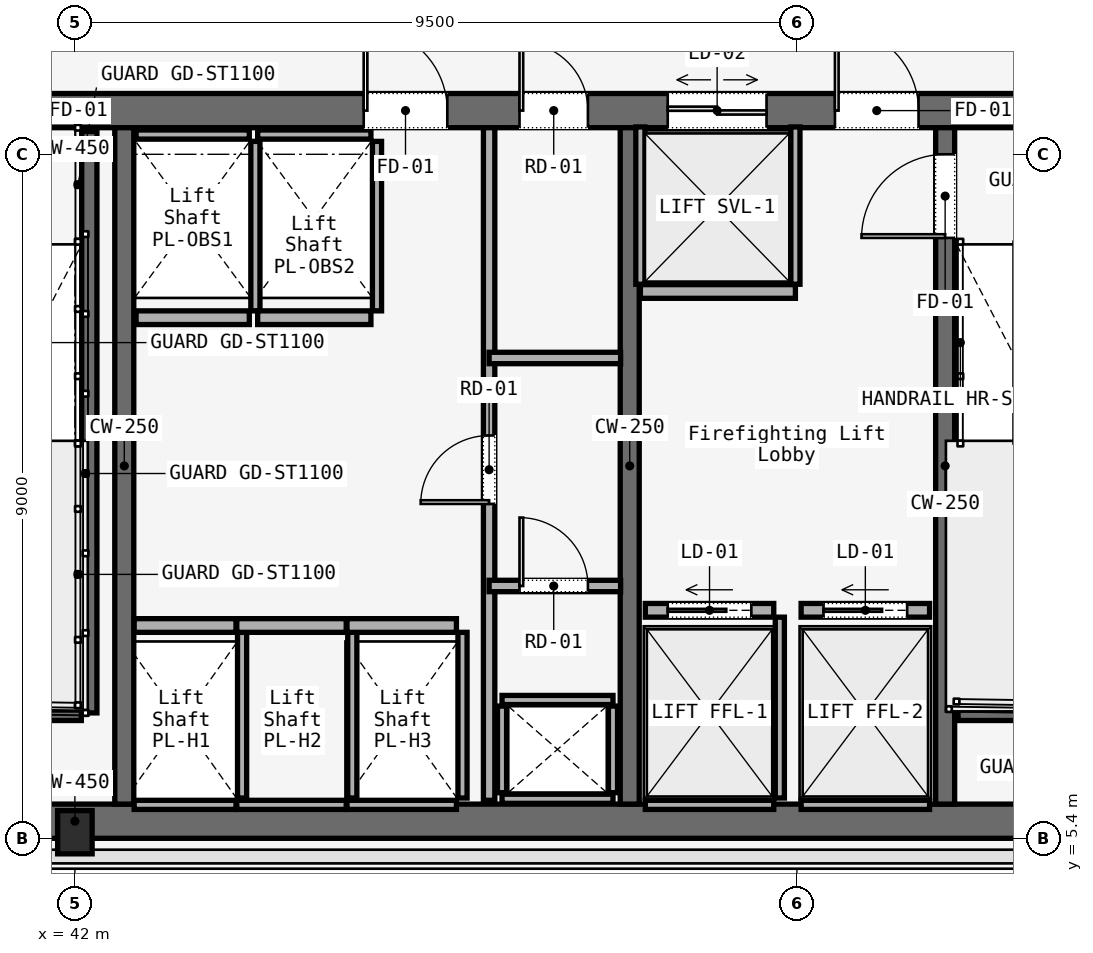
"""IFC4 building model, lengths in metres.
Left out: names, types, materials, properties, quantities, classifications, styles, units other than length and angle.
Written with IfcOpenShell. Run it as: python <this file> out.ifc"""

import sys

from ifc_helpers import new_model, si_unit, direction, frame, frame_2d, origin, origin_2d, place, context, subcontext, project, spatial, rectangle, i_section, extrude, element, fill, save


model = new_model("IFC4")
c1 = context("Model", 3, precision=1e-05, world=origin(), true_north=direction((0.0, 1.0)))
c2 = subcontext(c1, "Body", "Model", "MODEL_VIEW")
j1 = project(units=[si_unit("LENGTHUNIT", "METRE"), si_unit("PLANEANGLEUNIT", "RADIAN")], contexts=[c1])
p1 = place(None, origin())
s1 = spatial("IfcSite", under=j1, at=p1, CompositionType="ELEMENT")
p2 = place(p1, origin())
s2 = spatial("IfcBuilding", under=s1, at=p2, CompositionType="ELEMENT")
p3 = place(p2, frame((0.0, 0.0, 55.0)))
s3 = spatial("IfcBuildingStorey", under=s2, at=p3, CompositionType="ELEMENT", Elevation=55.0)
p4 = place(p3, frame((26.45, 14.975, 0.0), z_axis=(0.0, 0.0, 1.0), x_axis=(1.0, 0.0, 0.0)))
e1 = element("IfcWall", 1, at=p4, inside=s3, PredefinedType="SOLIDWALL", context=c2, shape_type="SweptSolid", body=[
    extrude(rectangle(XDim=31.1, YDim=0.45, at=frame_2d((15.55, 0.0))), origin(), (0.0, 0.0, 1.0), 3.58),
])
p5 = place(p4, frame((1.65, 0.0, 0.0)))
e2 = element("IfcOpeningElement", 2, at=p5, cuts=e1, PredefinedType="OPENING", context=c2, shape_type="SweptSolid", body=[
    extrude(rectangle(XDim=1.1, YDim=2.2, at=frame_2d((0.55, 1.1))), frame((0.0, 0.225, 0.0), z_axis=(0.0, -1.0, 0.0), x_axis=(1.0, 0.0, 0.0)), (0.0, 0.0, 1.0), 0.45),
])
p6 = place(p4, frame((13.65, 0.0, 0.0)))
e3 = element("IfcOpeningElement", 3, at=p6, cuts=e1, PredefinedType="OPENING", context=c2, shape_type="SweptSolid", body=[
    extrude(rectangle(XDim=1.1, YDim=2.2, at=frame_2d((0.55, 1.1))), frame((0.0, 0.225, 0.0), z_axis=(0.0, -1.0, 0.0), x_axis=(1.0, 0.0, 0.0)), (0.0, 0.0, 1.0), 0.45),
])
p7 = place(p4, frame((25.55, 0.0, 0.0)))
e4 = element("IfcOpeningElement", 4, at=p7, cuts=e1, PredefinedType="OPENING", context=c2, shape_type="SweptSolid", body=[
    extrude(rectangle(XDim=1.1, YDim=2.2, at=frame_2d((0.55, 1.1))), frame((0.0, 0.225, 0.0), z_axis=(0.0, -1.0, 0.0), x_axis=(1.0, 0.0, 0.0)), (0.0, 0.0, 1.0), 0.45),
])
p8 = place(p4, frame((10.7, 0.0, 0.0)))
e5 = element("IfcOpeningElement", 5, at=p8, cuts=e1, PredefinedType="OPENING", context=c2, shape_type="SweptSolid", body=[
    extrude(rectangle(XDim=1.4, YDim=2.2, at=frame_2d((0.7, 1.1))), frame((0.0, 0.225, 0.0), z_axis=(0.0, -1.0, 0.0), x_axis=(1.0, 0.0, 0.0)), (0.0, 0.0, 1.0), 0.45),
])
p9 = place(p4, frame((19.35, 0.0, 0.0)))
e6 = element("IfcOpeningElement", 6, at=p9, cuts=e1, PredefinedType="OPENING", context=c2, shape_type="SweptSolid", body=[
    extrude(rectangle(XDim=1.1, YDim=2.2, at=frame_2d((0.55, 1.1))), frame((0.0, 0.225, 0.0), z_axis=(0.0, -1.0, 0.0), x_axis=(1.0, 0.0, 0.0)), (0.0, 0.0, 1.0), 0.45),
])
p10 = place(p4, frame((21.4, 0.0, 0.0)))
e7 = element("IfcOpeningElement", 7, at=p10, cuts=e1, PredefinedType="OPENING", context=c2, shape_type="SweptSolid", body=[
    extrude(rectangle(XDim=0.9, YDim=2.1, at=frame_2d((0.45, 1.05))), frame((0.0, 0.225, 0.0), z_axis=(0.0, -1.0, 0.0), x_axis=(1.0, 0.0, 0.0)), (0.0, 0.0, 1.0), 0.45),
])
p11 = place(p4, frame((23.35, 0.0, 0.0)))
e8 = element("IfcOpeningElement", 8, at=p11, cuts=e1, PredefinedType="OPENING", context=c2, shape_type="SweptSolid", body=[
    extrude(rectangle(XDim=1.3, YDim=2.3, at=frame_2d((0.65, 1.15))), frame((0.0, 0.225, 0.0), z_axis=(0.0, -1.0, 0.0), x_axis=(1.0, 0.0, 0.0)), (0.0, 0.0, 1.0), 0.45),
])
p12 = place(p3, frame((26.45, 5.625, 0.0), z_axis=(0.0, 0.0, 1.0), x_axis=(1.0, 0.0, 0.0)))
e9 = element("IfcWall", 9, at=p12, inside=s3, PredefinedType="SOLIDWALL", context=c2, shape_type="SweptSolid", body=[
    extrude(rectangle(XDim=31.1, YDim=0.45, at=frame_2d((15.55, 0.0))), origin(), (0.0, 0.0, 1.0), 3.58),
])
for number, where, z_axis, x_axis in (
    (10, (42.65, 5.85, 0.0), (0.0, 0.0, 1.0), (0.0, 1.0, 0.0)),
    (11, (49.3, 5.85, 0.0), (0.0, 0.0, 1.0), (0.0, 1.0, 0.0)),
):
    element("IfcWall", number, at=place(p3, frame(where, z_axis=z_axis, x_axis=x_axis)), inside=s3, PredefinedType="SOLIDWALL", context=c2, shape_type="SweptSolid", body=[
        extrude(rectangle(XDim=8.9, YDim=0.25, at=frame_2d((4.45, 0.0))), origin(), (0.0, 0.0, 1.0), 3.58),
    ])
p13 = place(p3, frame((53.45, 5.85, 0.0), z_axis=(0.0, 0.0, 1.0), x_axis=(0.0, 1.0, 0.0)))
e12 = element("IfcWall", 12, at=p13, inside=s3, PredefinedType="SOLIDWALL", context=c2, shape_type="SweptSolid", body=[
    extrude(rectangle(XDim=8.9, YDim=0.25, at=frame_2d((4.45, 0.0))), origin(), (0.0, 0.0, 1.0), 3.58),
])
p14 = place(p13, frame((7.45, 0.0, 0.0)))
e13 = element("IfcOpeningElement", 13, at=p14, cuts=e12, PredefinedType="OPENING", context=c2, shape_type="SweptSolid", body=[
    extrude(rectangle(XDim=1.1, YDim=2.2, at=frame_2d((0.55, 1.1))), frame((0.0, 0.125, 0.0), z_axis=(0.0, -1.0, 0.0), x_axis=(1.0, 0.0, 0.0)), (0.0, 0.0, 1.0), 0.25),
])
p15 = place(p3, frame((42.0, 5.48, 0.0), z_axis=(0.0, 0.0, 1.0), x_axis=(1.0, 0.0, 0.0)))
e14 = element("IfcColumn", 14, at=p15, inside=s3, PredefinedType="COLUMN", context=c2, shape_type="SweptSolid", body=[
    extrude(i_section(OverallWidth=0.454, OverallDepth=0.569, WebThickness=0.078, FlangeThickness=0.08, FilletRadius=0.015, at=origin_2d()), origin(), (0.0, 0.0, 1.0), 3.58),
])
p16 = place(p3, frame((42.19, 14.7, 0.0), z_axis=(0.0, 0.0, 1.0), x_axis=(0.0, -1.0, 0.0)))
e15 = element("IfcWall", 15, at=p16, inside=s3, PredefinedType="SOLIDWALL", context=c2, shape_type="SweptSolid", body=[
    extrude(rectangle(XDim=7.65, YDim=0.2, at=frame_2d((3.825, 0.0))), origin(), (0.0, 0.0, 1.0), 3.8),
])
for number, where, z_axis, x_axis in (
    (16, (38.97, 7.05, 0.0), (0.0, 0.0, 1.0), (1.0, 0.0, 0.0)),
    (17, (53.62, 7.05, 0.0), (0.0, 0.0, 1.0), (1.0, 0.0, 0.0)),
):
    element("IfcWall", number, at=place(p3, frame(where, z_axis=z_axis, x_axis=x_axis)), inside=s3, PredefinedType="SOLIDWALL", context=c2, shape_type="SweptSolid", body=[
        extrude(rectangle(XDim=3.115, YDim=0.2, at=frame_2d((1.558, 0.0))), origin(), (0.0, 0.0, 1.0), 3.8),
    ])
for number, where, z_axis, x_axis in (
    (18, (47.62, 5.92, 0.0), (0.0, 0.0, 1.0), (1.0, 0.0, 0.0)),
    (19, (47.62, 7.22, 0.0), (0.0, 0.0, 1.0), (1.0, 0.0, 0.0)),
):
    element("IfcWall", number, at=place(p3, frame(where, z_axis=z_axis, x_axis=x_axis)), inside=s3, PredefinedType="SOLIDWALL", context=c2, shape_type="SweptSolid", body=[
        extrude(rectangle(XDim=1.46, YDim=0.12, at=frame_2d((0.73, 0.0))), origin(), (0.0, 0.0, 1.0), 2.933),
    ])
for number, where, z_axis, x_axis in (
    (20, (47.62, 6.0, 0.0), (0.0, 0.0, 1.0), (0.0, 1.0, 0.0)),
    (21, (49.08, 6.0, 0.0), (0.0, 0.0, 1.0), (0.0, 1.0, 0.0)),
):
    element("IfcWall", number, at=place(p3, frame(where, z_axis=z_axis, x_axis=x_axis)), inside=s3, PredefinedType="SOLIDWALL", context=c2, shape_type="SweptSolid", body=[
        extrude(rectangle(XDim=1.14, YDim=0.12, at=frame_2d((0.57, 0.0))), origin(), (0.0, 0.0, 1.0), 2.933),
    ])
p17 = place(p3, frame((47.45, 5.9, 0.0), z_axis=(0.0, 0.0, 1.0), x_axis=(0.0, 1.0, 0.0)))
e22 = element("IfcWall", 22, at=p17, inside=s3, PredefinedType="PARTITIONING", context=c2, shape_type="SweptSolid", body=[
    extrude(rectangle(XDim=8.85, YDim=0.15, at=frame_2d((4.425, 0.0))), origin(), (0.0, 0.0, 1.0), 2.933),
])
p18 = place(p17, frame((3.9, 0.0, 0.0)))
e23 = element("IfcOpeningElement", 23, at=p18, cuts=e22, PredefinedType="OPENING", context=c2, shape_type="SweptSolid", body=[
    extrude(rectangle(XDim=0.9, YDim=2.1, at=frame_2d((0.45, 1.05))), frame((0.0, 0.075, 0.0), z_axis=(0.0, -1.0, 0.0), x_axis=(1.0, 0.0, 0.0)), (0.0, 0.0, 1.0), 0.15),
])
p19 = place(p3, frame((47.45, 8.72, 0.0), z_axis=(0.0, 0.0, 1.0), x_axis=(1.0, 0.0, 0.0)))
e24 = element("IfcWall", 24, at=p19, inside=s3, PredefinedType="PARTITIONING", context=c2, shape_type="SweptSolid", body=[
    extrude(rectangle(XDim=1.73, YDim=0.15, at=frame_2d((0.865, 0.0))), origin(), (0.0, 0.0, 1.0), 2.933),
])
p20 = place(p19, frame((0.4, 0.0, 0.0)))
e25 = element("IfcOpeningElement", 25, at=p20, cuts=e24, PredefinedType="OPENING", context=c2, shape_type="SweptSolid", body=[
    extrude(rectangle(XDim=0.9, YDim=2.1, at=frame_2d((0.45, 1.05))), frame((0.0, 0.075, 0.0), z_axis=(0.0, -1.0, 0.0), x_axis=(1.0, 0.0, 0.0)), (0.0, 0.0, 1.0), 0.15),
])
p21 = place(p3, frame((47.45, 11.72, 0.0), z_axis=(0.0, 0.0, 1.0), x_axis=(1.0, 0.0, 0.0)))
e26 = element("IfcWall", 26, at=p21, inside=s3, PredefinedType="PARTITIONING", context=c2, shape_type="SweptSolid", body=[
    extrude(rectangle(XDim=1.73, YDim=0.15, at=frame_2d((0.865, 0.0))), origin(), (0.0, 0.0, 1.0), 2.933),
])
p22 = place(p3, frame((42.78, 8.2, 0.0), z_axis=(0.0, 0.0, 1.0), x_axis=(1.0, 0.0, 0.0)))
e27 = element("IfcWall", 27, at=p22, inside=s3, PredefinedType="SOLIDWALL", context=c2, shape_type="SweptSolid", body=[
    extrude(rectangle(XDim=1.34, YDim=0.18, at=frame_2d((0.67, 0.0))), origin(), (0.0, 0.0, 1.0), 2.933),
])
p23 = place(p3, frame((42.78, 5.84, 0.0), z_axis=(0.0, 0.0, 1.0), x_axis=(1.0, 0.0, 0.0)))
e28 = element("IfcWall", 28, at=p23, inside=s3, PredefinedType="SOLIDWALL", context=c2, shape_type="SweptSolid", body=[
    extrude(rectangle(XDim=1.34, YDim=0.12, at=frame_2d((0.67, 0.0))), origin(), (0.0, 0.0, 1.0), 2.933),
])
p24 = place(p3, frame((44.2, 5.93, 0.0), z_axis=(0.0, 0.0, 1.0), x_axis=(0.0, 1.0, 0.0)))
e29 = element("IfcWall", 29, at=p24, inside=s3, PredefinedType="SOLIDWALL", context=c2, shape_type="SweptSolid", body=[
    extrude(rectangle(XDim=2.18, YDim=0.12, at=frame_2d((1.09, 0.0))), origin(), (0.0, 0.0, 1.0), 2.933),
])
p25 = place(p3, frame((44.13, 8.2, 0.0), z_axis=(0.0, 0.0, 1.0), x_axis=(1.0, 0.0, 0.0)))
e30 = element("IfcWall", 30, at=p25, inside=s3, PredefinedType="SOLIDWALL", context=c2, shape_type="SweptSolid", body=[
    extrude(rectangle(XDim=1.44, YDim=0.18, at=frame_2d((0.72, 0.0))), origin(), (0.0, 0.0, 1.0), 2.933),
])
p26 = place(p3, frame((44.13, 5.84, 0.0), z_axis=(0.0, 0.0, 1.0), x_axis=(1.0, 0.0, 0.0)))
e31 = element("IfcWall", 31, at=p26, inside=s3, PredefinedType="SOLIDWALL", context=c2, shape_type="SweptSolid", body=[
    extrude(rectangle(XDim=1.44, YDim=0.12, at=frame_2d((0.72, 0.0))), origin(), (0.0, 0.0, 1.0), 2.933),
])
p27 = place(p3, frame((45.65, 5.93, 0.0), z_axis=(0.0, 0.0, 1.0), x_axis=(0.0, 1.0, 0.0)))
e32 = element("IfcWall", 32, at=p27, inside=s3, PredefinedType="SOLIDWALL", context=c2, shape_type="SweptSolid", body=[
    extrude(rectangle(XDim=2.18, YDim=0.12, at=frame_2d((1.09, 0.0))), origin(), (0.0, 0.0, 1.0), 2.933),
])
p28 = place(p3, frame((45.58, 8.2, 0.0), z_axis=(0.0, 0.0, 1.0), x_axis=(1.0, 0.0, 0.0)))
e33 = element("IfcWall", 33, at=p28, inside=s3, PredefinedType="SOLIDWALL", context=c2, shape_type="SweptSolid", body=[
    extrude(rectangle(XDim=1.44, YDim=0.18, at=frame_2d((0.72, 0.0))), origin(), (0.0, 0.0, 1.0), 2.933),
])
p29 = place(p3, frame((45.58, 5.84, 0.0), z_axis=(0.0, 0.0, 1.0), x_axis=(1.0, 0.0, 0.0)))
e34 = element("IfcWall", 34, at=p29, inside=s3, PredefinedType="SOLIDWALL", context=c2, shape_type="SweptSolid", body=[
    extrude(rectangle(XDim=1.44, YDim=0.12, at=frame_2d((0.72, 0.0))), origin(), (0.0, 0.0, 1.0), 2.933),
])
p30 = place(p3, frame((47.1, 5.93, 0.0), z_axis=(0.0, 0.0, 1.0), x_axis=(0.0, 1.0, 0.0)))
e35 = element("IfcWall", 35, at=p30, inside=s3, PredefinedType="SOLIDWALL", context=c2, shape_type="SweptSolid", body=[
    extrude(rectangle(XDim=2.18, YDim=0.12, at=frame_2d((1.09, 0.0))), origin(), (0.0, 0.0, 1.0), 2.933),
])
p31 = place(p3, frame((42.805, 12.25, 0.0), z_axis=(0.0, 0.0, 1.0), x_axis=(1.0, 0.0, 0.0)))
e36 = element("IfcWall", 36, at=p31, inside=s3, PredefinedType="SOLIDWALL", context=c2, shape_type="SweptSolid", body=[
    extrude(rectangle(XDim=1.49, YDim=0.18, at=frame_2d((0.745, 0.0))), origin(), (0.0, 0.0, 1.0), 2.933),
])
p32 = place(p3, frame((42.805, 14.66, 0.0), z_axis=(0.0, 0.0, 1.0), x_axis=(1.0, 0.0, 0.0)))
e37 = element("IfcWall", 37, at=p32, inside=s3, PredefinedType="SOLIDWALL", context=c2, shape_type="SweptSolid", body=[
    extrude(rectangle(XDim=1.49, YDim=0.12, at=frame_2d((0.745, 0.0))), origin(), (0.0, 0.0, 1.0), 2.933),
])
p33 = place(p3, frame((44.375, 12.34, 0.0), z_axis=(0.0, 0.0, 1.0), x_axis=(0.0, 1.0, 0.0)))
e38 = element("IfcWall", 38, at=p33, inside=s3, PredefinedType="SOLIDWALL", context=c2, shape_type="SweptSolid", body=[
    extrude(rectangle(XDim=2.23, YDim=0.12, at=frame_2d((1.115, 0.0))), origin(), (0.0, 0.0, 1.0), 2.933),
])
p34 = place(p3, frame((44.405, 12.25, 0.0), z_axis=(0.0, 0.0, 1.0), x_axis=(1.0, 0.0, 0.0)))
e39 = element("IfcWall", 39, at=p34, inside=s3, PredefinedType="SOLIDWALL", context=c2, shape_type="SweptSolid", body=[
    extrude(rectangle(XDim=1.49, YDim=0.18, at=frame_2d((0.745, 0.0))), origin(), (0.0, 0.0, 1.0), 2.933),
])
p35 = place(p3, frame((44.405, 14.66, 0.0), z_axis=(0.0, 0.0, 1.0), x_axis=(1.0, 0.0, 0.0)))
e40 = element("IfcWall", 40, at=p35, inside=s3, PredefinedType="SOLIDWALL", context=c2, shape_type="SweptSolid", body=[
    extrude(rectangle(XDim=1.49, YDim=0.12, at=frame_2d((0.745, 0.0))), origin(), (0.0, 0.0, 1.0), 2.933),
])
p36 = place(p3, frame((45.975, 12.34, 0.0), z_axis=(0.0, 0.0, 1.0), x_axis=(0.0, 1.0, 0.0)))
e41 = element("IfcWall", 41, at=p36, inside=s3, PredefinedType="SOLIDWALL", context=c2, shape_type="SweptSolid", body=[
    extrude(rectangle(XDim=2.23, YDim=0.12, at=frame_2d((1.115, 0.0))), origin(), (0.0, 0.0, 1.0), 2.933),
])
p37 = place(p3, frame((49.505, 8.4, 0.0), z_axis=(0.0, 0.0, 1.0), x_axis=(1.0, 0.0, 0.0)))
e42 = element("IfcWall", 42, at=p37, inside=s3, PredefinedType="SOLIDWALL", context=c2, shape_type="SweptSolid", body=[
    extrude(rectangle(XDim=1.69, YDim=0.18, at=frame_2d((0.845, 0.0))), origin(), (0.0, 0.0, 1.0), 2.933),
])
p38 = place(p37, frame((0.295, 0.0, 0.0)))
e43 = element("IfcOpeningElement", 43, at=p38, cuts=e42, PredefinedType="OPENING", context=c2, shape_type="SweptSolid", body=[
    extrude(rectangle(XDim=1.1, YDim=2.2, at=frame_2d((0.55, 1.1))), frame((0.0, 0.09, 0.0), z_axis=(0.0, -1.0, 0.0), x_axis=(1.0, 0.0, 0.0)), (0.0, 0.0, 1.0), 0.18),
])
p39 = place(p3, frame((49.505, 5.84, 0.0), z_axis=(0.0, 0.0, 1.0), x_axis=(1.0, 0.0, 0.0)))
e44 = element("IfcWall", 44, at=p39, inside=s3, PredefinedType="SOLIDWALL", context=c2, shape_type="SweptSolid", body=[
    extrude(rectangle(XDim=1.69, YDim=0.12, at=frame_2d((0.845, 0.0))), origin(), (0.0, 0.0, 1.0), 2.933),
])
p40 = place(p3, frame((51.275, 5.93, 0.0), z_axis=(0.0, 0.0, 1.0), x_axis=(0.0, 1.0, 0.0)))
e45 = element("IfcWall", 45, at=p40, inside=s3, PredefinedType="SOLIDWALL", context=c2, shape_type="SweptSolid", body=[
    extrude(rectangle(XDim=2.38, YDim=0.12, at=frame_2d((1.19, 0.0))), origin(), (0.0, 0.0, 1.0), 2.933),
])
p41 = place(p3, frame((51.555, 8.4, 0.0), z_axis=(0.0, 0.0, 1.0), x_axis=(1.0, 0.0, 0.0)))
e46 = element("IfcWall", 46, at=p41, inside=s3, PredefinedType="SOLIDWALL", context=c2, shape_type="SweptSolid", body=[
    extrude(rectangle(XDim=1.69, YDim=0.18, at=frame_2d((0.845, 0.0))), origin(), (0.0, 0.0, 1.0), 2.933),
])
p42 = place(p41, frame((0.295, 0.0, 0.0)))
e47 = element("IfcOpeningElement", 47, at=p42, cuts=e46, PredefinedType="OPENING", context=c2, shape_type="SweptSolid", body=[
    extrude(rectangle(XDim=1.1, YDim=2.2, at=frame_2d((0.55, 1.1))), frame((0.0, 0.09, 0.0), z_axis=(0.0, -1.0, 0.0), x_axis=(1.0, 0.0, 0.0)), (0.0, 0.0, 1.0), 0.18),
])
p43 = place(p3, frame((51.555, 5.84, 0.0), z_axis=(0.0, 0.0, 1.0), x_axis=(1.0, 0.0, 0.0)))
e48 = element("IfcWall", 48, at=p43, inside=s3, PredefinedType="SOLIDWALL", context=c2, shape_type="SweptSolid", body=[
    extrude(rectangle(XDim=1.69, YDim=0.12, at=frame_2d((0.845, 0.0))), origin(), (0.0, 0.0, 1.0), 2.933),
])
p44 = place(p3, frame((49.44, 12.595, 0.0), z_axis=(0.0, 0.0, 1.0), x_axis=(1.0, 0.0, 0.0)))
e49 = element("IfcWall", 49, at=p44, inside=s3, PredefinedType="SOLIDWALL", context=c2, shape_type="SweptSolid", body=[
    extrude(rectangle(XDim=2.04, YDim=0.18, at=frame_2d((1.02, 0.0))), origin(), (0.0, 0.0, 1.0), 2.933),
])
for number, where, z_axis, x_axis in (
    (50, (49.44, 12.69, 0.0), (0.0, 0.0, 1.0), (0.0, 1.0, 0.0)),
    (51, (51.48, 12.69, 0.0), (0.0, 0.0, 1.0), (0.0, 1.0, 0.0)),
):
    element("IfcWall", number, at=place(p3, frame(where, z_axis=z_axis, x_axis=x_axis)), inside=s3, PredefinedType="SOLIDWALL", context=c2, shape_type="SweptSolid", body=[
        extrude(rectangle(XDim=2.07, YDim=0.12, at=frame_2d((1.035, 0.0))), origin(), (0.0, 0.0, 1.0), 2.933),
    ])
p45 = place(p7, origin())
e52 = element("IfcDoor", 52, at=p45, inside=s3, OperationType="SINGLE_SWING_RIGHT", PredefinedType="DOOR", context=c2, shape_type="SweptSolid", body=[
    extrude(rectangle(XDim=1.1, YDim=2.2, at=frame_2d((0.55, 1.1))), frame((0.0, 0.025, 0.0), z_axis=(0.0, -1.0, 0.0), x_axis=(1.0, 0.0, 0.0)), (0.0, 0.0, 1.0), 0.05),
])
fill(e4, e52)
p46 = place(p9, origin())
e53 = element("IfcDoor", 53, at=p46, inside=s3, OperationType="SINGLE_SWING_LEFT", PredefinedType="DOOR", context=c2, shape_type="SweptSolid", body=[
    extrude(rectangle(XDim=1.1, YDim=2.2, at=frame_2d((0.55, 1.1))), frame((0.0, 0.025, 0.0), z_axis=(0.0, -1.0, 0.0), x_axis=(1.0, 0.0, 0.0)), (0.0, 0.0, 1.0), 0.05),
])
fill(e6, e53)
p47 = place(p10, origin())
e54 = element("IfcDoor", 54, at=p47, inside=s3, OperationType="SINGLE_SWING_LEFT", PredefinedType="DOOR", context=c2, shape_type="SweptSolid", body=[
    extrude(rectangle(XDim=0.9, YDim=2.1, at=frame_2d((0.45, 1.05))), frame((0.0, 0.025, 0.0), z_axis=(0.0, -1.0, 0.0), x_axis=(1.0, 0.0, 0.0)), (0.0, 0.0, 1.0), 0.05),
])
fill(e7, e54)
p48 = place(p14, origin())
e55 = element("IfcDoor", 55, at=p48, inside=s3, OperationType="SINGLE_SWING_LEFT", PredefinedType="DOOR", context=c2, shape_type="SweptSolid", body=[
    extrude(rectangle(XDim=1.1, YDim=2.2, at=frame_2d((0.55, 1.1))), frame((0.0, 0.025, 0.0), z_axis=(0.0, -1.0, 0.0), x_axis=(1.0, 0.0, 0.0)), (0.0, 0.0, 1.0), 0.05),
])
fill(e13, e55)
p49 = place(p18, origin())
e56 = element("IfcDoor", 56, at=p49, inside=s3, OperationType="SINGLE_SWING_LEFT", PredefinedType="DOOR", context=c2, shape_type="SweptSolid", body=[
    extrude(rectangle(XDim=0.9, YDim=2.1, at=frame_2d((0.45, 1.05))), frame((0.0, 0.025, 0.0), z_axis=(0.0, -1.0, 0.0), x_axis=(1.0, 0.0, 0.0)), (0.0, 0.0, 1.0), 0.05),
])
fill(e23, e56)
p50 = place(p20, origin())
e57 = element("IfcDoor", 57, at=p50, inside=s3, OperationType="SINGLE_SWING_RIGHT", PredefinedType="DOOR", context=c2, shape_type="SweptSolid", body=[
    extrude(rectangle(XDim=0.9, YDim=2.1, at=frame_2d((0.45, 1.05))), frame((0.0, 0.025, 0.0), z_axis=(0.0, -1.0, 0.0), x_axis=(1.0, 0.0, 0.0)), (0.0, 0.0, 1.0), 0.05),
])
fill(e25, e57)
p51 = place(p38, origin())
e58 = element("IfcDoor", 58, at=p51, inside=s3, OperationType="SLIDING_TO_LEFT", PredefinedType="DOOR", context=c2, shape_type="SweptSolid", body=[
    extrude(rectangle(XDim=1.1, YDim=2.2, at=frame_2d((0.55, 1.1))), frame((0.0, 0.025, 0.0), z_axis=(0.0, -1.0, 0.0), x_axis=(1.0, 0.0, 0.0)), (0.0, 0.0, 1.0), 0.05),
])
fill(e43, e58)
p52 = place(p42, origin())
e59 = element("IfcDoor", 59, at=p52, inside=s3, OperationType="SLIDING_TO_LEFT", PredefinedType="DOOR", context=c2, shape_type="SweptSolid", body=[
    extrude(rectangle(XDim=1.1, YDim=2.2, at=frame_2d((0.55, 1.1))), frame((0.0, 0.025, 0.0), z_axis=(0.0, -1.0, 0.0), x_axis=(1.0, 0.0, 0.0)), (0.0, 0.0, 1.0), 0.05),
])
fill(e47, e59)
p53 = place(p11, origin())
e60 = element("IfcDoor", 60, at=p53, inside=s3, OperationType="DOUBLE_DOOR_SLIDING", PredefinedType="DOOR", context=c2, shape_type="SweptSolid", body=[
    extrude(rectangle(XDim=1.3, YDim=2.3, at=frame_2d((0.65, 1.15))), frame((0.0, 0.025, 0.0), z_axis=(0.0, -1.0, 0.0), x_axis=(1.0, 0.0, 0.0)), (0.0, 0.0, 1.0), 0.05),
])
fill(e8, e60)
save(model, sys.argv[1])
